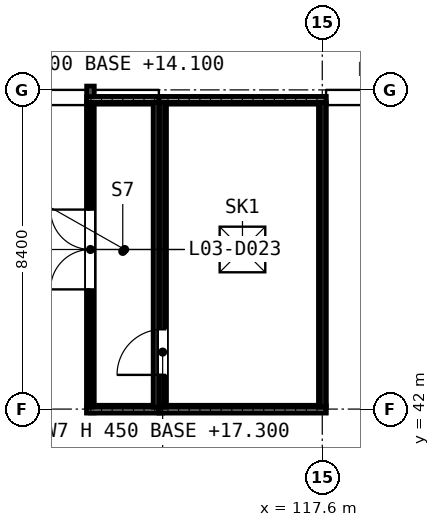
"""IFC4 building model, lengths in metres.
Left out: names, types, materials, properties, quantities, classifications, styles, units other than length and angle.
Written with IfcOpenShell. Run it as: python <this file> out.ifc"""

import sys

from ifc_helpers import new_model, si_unit, direction, frame, frame_2d, origin, origin_2d, place, context, subcontext, project, spatial, rectangle, extrude, element, fill, save


model = new_model("IFC4")
c1 = context("Model", 3, precision=1e-05, world=origin(), true_north=direction((0.0, 1.0)))
c2 = subcontext(c1, "Body", "Model", "MODEL_VIEW")
j1 = project(units=[si_unit("LENGTHUNIT", "METRE"), si_unit("PLANEANGLEUNIT", "RADIAN")], contexts=[c1])
p1 = place(None, origin())
s1 = spatial("IfcSite", under=j1, at=p1, CompositionType="ELEMENT")
p2 = place(p1, origin())
s2 = spatial("IfcBuilding", under=s1, at=p2, CompositionType="ELEMENT")
p3 = place(p2, frame((0.0, 0.0, 14.4)))
s3 = spatial("IfcBuildingStorey", under=s2, at=p3, CompositionType="ELEMENT", Elevation=14.4)
for number, where, z_axis, x_axis in (
    (1, (113.3, 42.0, -0.3), (0.0, 0.0, 1.0), (1.0, 0.0, 0.0)),
    (2, (113.3, 50.125, -0.3), (0.0, 0.0, 1.0), (1.0, 0.0, 0.0)),
):
    element("IfcWall", number, at=place(p3, frame(where, z_axis=z_axis, x_axis=x_axis)), inside=s3, PredefinedType="SHEAR", context=c2, shape_type="SweptSolid", body=[
        extrude(rectangle(XDim=4.4, YDim=0.2, at=frame_2d((2.2, 0.0))), origin(), (0.0, 0.0, 1.0), 3.0),
    ])
p4 = place(p3, frame((113.4, 42.1, -0.3), z_axis=(0.0, 0.0, 1.0), x_axis=(0.0, 1.0, 0.0)))
e3 = element("IfcWall", 3, at=p4, inside=s3, PredefinedType="SHEAR", context=c2, shape_type="SweptSolid", body=[
    extrude(rectangle(XDim=7.925, YDim=0.2, at=frame_2d((3.962, 0.0))), origin(), (0.0, 0.0, 1.0), 3.0),
])
p5 = place(p4, frame((0.8, 0.0, 0.3)))
e4 = element("IfcOpeningElement", 4, at=p5, cuts=e3, PredefinedType="OPENING", context=c2, shape_type="SweptSolid", body=[
    extrude(rectangle(XDim=1.2, YDim=2.2, at=frame_2d((0.6, 1.1))), frame((0.0, 0.11, 0.0), z_axis=(0.0, -1.0, 0.0), x_axis=(1.0, 0.0, 0.0)), (0.0, 0.0, 1.0), 0.22),
])
p6 = place(p3, frame((117.6, 42.1, -0.3), z_axis=(0.0, 0.0, 1.0), x_axis=(0.0, 1.0, 0.0)))
e5 = element("IfcWall", 5, at=p6, inside=s3, PredefinedType="SHEAR", context=c2, shape_type="SweptSolid", body=[
    extrude(rectangle(XDim=7.925, YDim=0.2, at=frame_2d((3.962, 0.0))), origin(), (0.0, 0.0, 1.0), 3.0),
])
for number, where, z_axis, x_axis in (
    (6, (113.4, 42.0, -0.3), (0.0, 0.0, 1.0), (-1.0, 0.0, 0.0)),
    (7, (113.4, 50.125, -0.3), (0.0, 0.0, 1.0), (-1.0, 0.0, 0.0)),
):
    element("IfcWall", number, at=place(p3, frame(where, z_axis=z_axis, x_axis=x_axis)), inside=s3, PredefinedType="SHEAR", context=c2, shape_type="SweptSolid", body=[
        extrude(rectangle(XDim=1.9, YDim=0.2, at=frame_2d((0.95, 0.0))), origin(), (0.0, 0.0, 1.0), 3.0),
    ])
p7 = place(p3, frame((111.5, 41.9, -0.3), z_axis=(0.0, 0.0, 1.0), x_axis=(0.0, 1.0, 0.0)))
e8 = element("IfcWall", 8, at=p7, inside=s3, PredefinedType="SHEAR", context=c2, shape_type="SweptSolid", body=[
    extrude(rectangle(XDim=8.6, YDim=0.2, at=frame_2d((4.3, 0.0))), origin(), (0.0, 0.0, 1.0), 3.0),
])
p8 = place(p7, frame((3.25, 0.0, 0.3)))
e9 = element("IfcOpeningElement", 9, at=p8, cuts=e8, PredefinedType="OPENING", context=c2, shape_type="SweptSolid", body=[
    extrude(rectangle(XDim=2.1, YDim=2.2, at=frame_2d((1.05, 1.1))), frame((0.0, 0.11, 0.0), z_axis=(0.0, -1.0, 0.0), x_axis=(1.0, 0.0, 0.0)), (0.0, 0.0, 1.0), 0.22),
])
for number, where, z_axis, x_axis in (
    (10, (113.3, 41.975, 2.9), (0.0, 0.0, 1.0), (1.0, 0.0, 0.0)),
    (11, (113.3, 50.15, 2.9), (0.0, 0.0, 1.0), (1.0, 0.0, 0.0)),
):
    element("IfcWall", number, at=place(p3, frame(where, z_axis=z_axis, x_axis=x_axis)), inside=s3, PredefinedType="PARAPET", context=c2, shape_type="SweptSolid", body=[
        extrude(rectangle(XDim=4.4, YDim=0.15, at=frame_2d((2.2, 0.0))), origin(), (0.0, 0.0, 1.0), 0.45),
    ])
for number, where, z_axis, x_axis in (
    (12, (113.375, 42.05, 2.9), (0.0, 0.0, 1.0), (0.0, 1.0, 0.0)),
    (13, (117.625, 42.05, 2.9), (0.0, 0.0, 1.0), (0.0, 1.0, 0.0)),
):
    element("IfcWall", number, at=place(p3, frame(where, z_axis=z_axis, x_axis=x_axis)), inside=s3, PredefinedType="PARAPET", context=c2, shape_type="SweptSolid", body=[
        extrude(rectangle(XDim=8.025, YDim=0.15, at=frame_2d((4.012, 0.0))), origin(), (0.0, 0.0, 1.0), 0.45),
    ])
for number, where, z_axis, x_axis in (
    (14, (111.4, 41.975, 2.9), (0.0, 0.0, 1.0), (1.0, 0.0, 0.0)),
    (15, (111.4, 50.15, 2.9), (0.0, 0.0, 1.0), (1.0, 0.0, 0.0)),
):
    element("IfcWall", number, at=place(p3, frame(where, z_axis=z_axis, x_axis=x_axis)), inside=s3, PredefinedType="PARAPET", context=c2, shape_type="SweptSolid", body=[
        extrude(rectangle(XDim=1.9, YDim=0.15, at=frame_2d((0.95, 0.0))), origin(), (0.0, 0.0, 1.0), 0.45),
    ])
for number, where, z_axis, x_axis in (
    (16, (111.475, 42.05, 2.9), (0.0, 0.0, 1.0), (0.0, 1.0, 0.0)),
    (17, (113.225, 42.05, 2.9), (0.0, 0.0, 1.0), (0.0, 1.0, 0.0)),
):
    element("IfcWall", number, at=place(p3, frame(where, z_axis=z_axis, x_axis=x_axis)), inside=s3, PredefinedType="PARAPET", context=c2, shape_type="SweptSolid", body=[
        extrude(rectangle(XDim=8.025, YDim=0.15, at=frame_2d((4.012, 0.0))), origin(), (0.0, 0.0, 1.0), 0.45),
    ])
p9 = place(p8, origin())
e18 = element("IfcDoor", 18, at=p9, inside=s3, OperationType="DOUBLE_DOOR_SINGLE_SWING", PredefinedType="DOOR", context=c2, shape_type="SweptSolid", body=[
    extrude(rectangle(XDim=2.1, YDim=0.013, at=frame_2d((1.05, 0.007))), frame((0.0, 0.088, 0.0), z_axis=(0.0, -1.0, 0.0), x_axis=(1.0, 0.0, 0.0)), (0.0, 0.0, 1.0), 0.176),
    extrude(rectangle(XDim=0.075, YDim=2.112, at=frame_2d((0.038, 1.069))), frame((0.0, 0.098, 0.0), z_axis=(0.0, -1.0, 0.0), x_axis=(1.0, 0.0, 0.0)), (0.0, 0.0, 1.0), 0.196),
    extrude(rectangle(XDim=0.075, YDim=2.112, at=frame_2d((2.062, 1.069))), frame((0.0, 0.098, 0.0), z_axis=(0.0, -1.0, 0.0), x_axis=(1.0, 0.0, 0.0)), (0.0, 0.0, 1.0), 0.196),
    extrude(rectangle(XDim=2.1, YDim=0.075, at=frame_2d((1.05, 2.163))), frame((0.0, 0.088, 0.0), z_axis=(0.0, -1.0, 0.0), x_axis=(1.0, 0.0, 0.0)), (0.0, 0.0, 1.0), 0.176),
    extrude(rectangle(XDim=1.95, YDim=2.112, at=frame_2d((1.05, 1.069))), frame((0.0, 0.025, 0.0), z_axis=(0.0, -1.0, 0.0), x_axis=(1.0, 0.0, 0.0)), (0.0, 0.0, 1.0), 0.05),
])
fill(e9, e18)
p10 = place(p5, origin())
e19 = element("IfcDoor", 19, at=p10, inside=s3, OperationType="SINGLE_SWING_RIGHT", PredefinedType="DOOR", context=c2, shape_type="SweptSolid", body=[
    extrude(rectangle(XDim=1.2, YDim=2.2, at=frame_2d((0.6, 1.1))), frame((0.0, 0.025, 0.0), z_axis=(0.0, -1.0, 0.0), x_axis=(1.0, 0.0, 0.0)), (0.0, 0.0, 1.0), 0.05),
])
fill(e4, e19)
p11 = place(p3, frame((0.0, 0.0, 2.7)))
p12 = place(p11, frame((115.5, 46.2, 0.0)))
p13 = place(p12, frame((0.0, 0.0, 0.15)))
e20 = element("IfcWindow", 20, at=p13, inside=s3, PartitioningType="SINGLE_PANEL", PredefinedType="SKYLIGHT", context=c2, shape_type="SweptSolid", body=[
    extrude(rectangle(XDim=1.2, YDim=1.2, at=origin_2d()), origin(), (0.0, 0.0, 1.0), 0.05),
])
save(model, sys.argv[1])
